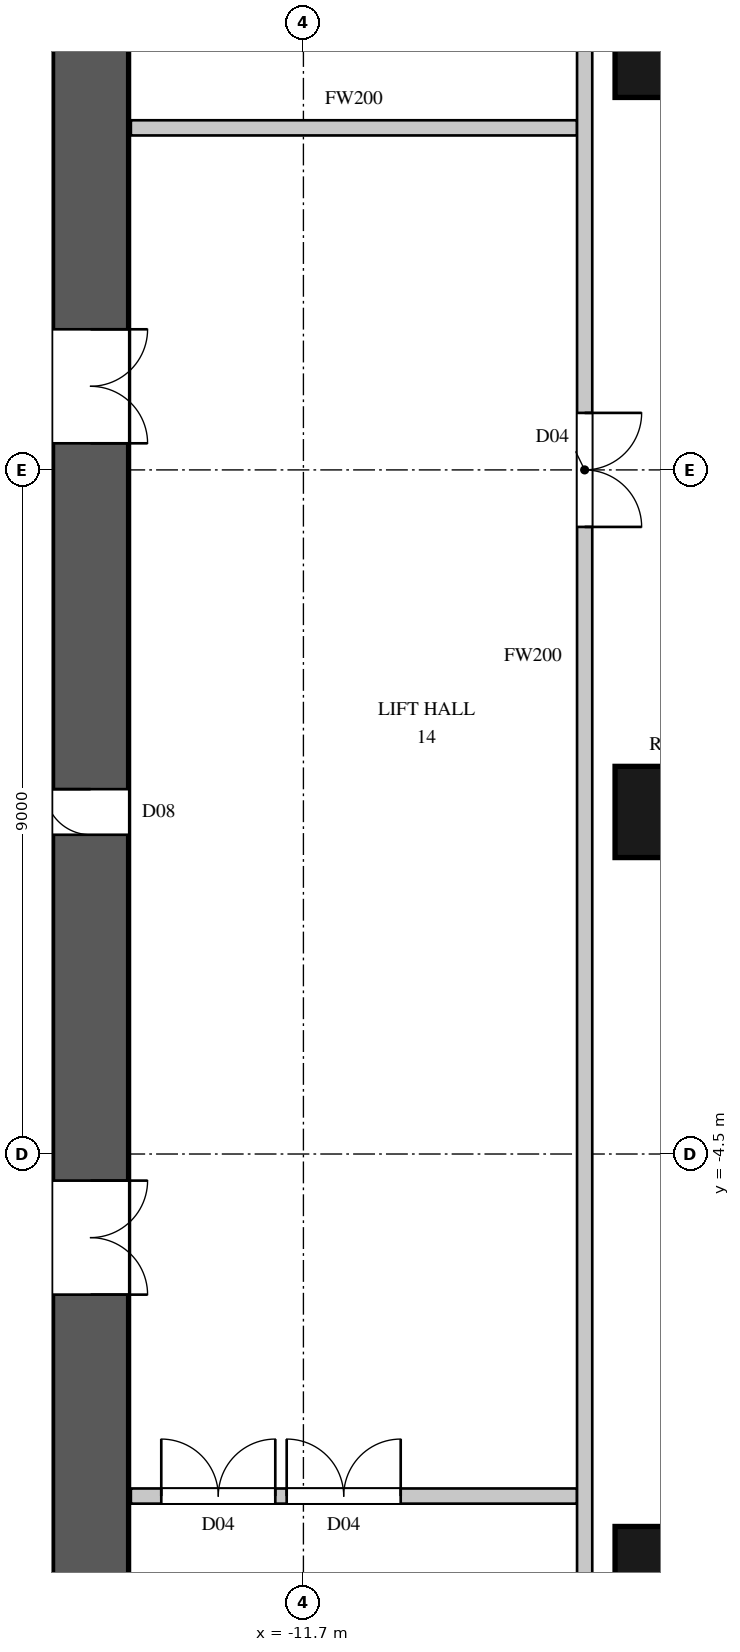
"""IFC4 building model, lengths in metres.
Left out: names, types, materials, properties, quantities, classifications, styles, units other than length and angle.
Written with IfcOpenShell. Run it as: python <this file> out.ifc"""

import sys

from ifc_helpers import new_model, si_unit, direction, frame, frame_2d, origin, origin_2d, place, context, subcontext, project, spatial, rectangle, circle, extrude, element, fill, save


model = new_model("IFC4")
c1 = context("Model", 3, precision=1e-05, world=origin(), true_north=direction((0.0, 1.0)))
c2 = subcontext(c1, "Body", "Model", "MODEL_VIEW")
j1 = project(units=[si_unit("LENGTHUNIT", "METRE"), si_unit("PLANEANGLEUNIT", "RADIAN")], contexts=[c1])
p1 = place(None, origin())
s1 = spatial("IfcSite", under=j1, at=p1, CompositionType="ELEMENT")
p2 = place(p1, origin())
s2 = spatial("IfcBuilding", under=s1, at=p2, CompositionType="ELEMENT")
p3 = place(p2, frame((0.0, 0.0, 80.7)))
s3 = spatial("IfcBuildingStorey", under=s2, at=p3, CompositionType="ELEMENT", Elevation=80.7)
for number, where, z_axis, x_axis in (
    (1, (-7.0, -10.0, 0.0), (0.0, 0.0, 1.0), (1.0, 0.0, 0.0)),
    (2, (-7.0, 0.0, 0.0), (0.0, 0.0, 1.0), (1.0, 0.0, 0.0)),
    (3, (-7.0, 10.0, 0.0), (0.0, 0.0, 1.0), (1.0, 0.0, 0.0)),
):
    element("IfcColumn", number, at=place(p3, frame(where, z_axis=z_axis, x_axis=x_axis)), inside=s3, PredefinedType="COLUMN", context=c2, shape_type="SweptSolid", body=[
        extrude(circle(Radius=0.6, at=origin_2d()), origin(), (0.0, 0.0, 1.0), 3.6),
    ])
p4 = place(p3, frame((-14.5, -14.8, 0.0), z_axis=(0.0, 0.0, 1.0), x_axis=(0.0, 1.0, 0.0)))
e4 = element("IfcWall", 4, at=p4, inside=s3, PredefinedType="SHEAR", context=c2, shape_type="SweptSolid", body=[
    extrude(rectangle(XDim=29.6, YDim=1.0, at=frame_2d((14.8, 0.0))), origin(), (0.0, 0.0, 1.0), 3.6),
])
p5 = place(p4, frame((8.45, 0.0, 0.0)))
e5 = element("IfcOpeningElement", 5, at=p5, cuts=e4, PredefinedType="OPENING", context=c2, shape_type="SweptSolid", body=[
    extrude(rectangle(XDim=1.5, YDim=2.4, at=frame_2d((0.75, 1.2))), frame((0.0, 0.51, 0.0), z_axis=(0.0, -1.0, 0.0), x_axis=(1.0, 0.0, 0.0)), (0.0, 0.0, 1.0), 1.02),
])
p6 = place(p4, frame((19.65, 0.0, 0.0)))
e6 = element("IfcOpeningElement", 6, at=p6, cuts=e4, PredefinedType="OPENING", context=c2, shape_type="SweptSolid", body=[
    extrude(rectangle(XDim=1.5, YDim=2.4, at=frame_2d((0.75, 1.2))), frame((0.0, 0.51, 0.0), z_axis=(0.0, -1.0, 0.0), x_axis=(1.0, 0.0, 0.0)), (0.0, 0.0, 1.0), 1.02),
])
p7 = place(p4, frame((14.5, 0.0, 0.0)))
e7 = element("IfcOpeningElement", 7, at=p7, cuts=e4, PredefinedType="OPENING", context=c2, shape_type="SweptSolid", body=[
    extrude(rectangle(XDim=0.6, YDim=2.0, at=frame_2d((0.3, 1.0))), frame((0.0, 0.51, 0.0), z_axis=(0.0, -1.0, 0.0), x_axis=(1.0, 0.0, 0.0)), (0.0, 0.0, 1.0), 1.02),
])
p8 = place(p3, frame((-13.97, -9.0, 0.0), z_axis=(0.0, 0.0, 1.0), x_axis=(1.0, 0.0, 0.0)))
e8 = element("IfcWall", 8, at=p8, inside=s3, PredefinedType="PARTITIONING", context=c2, shape_type="SweptSolid", body=[
    extrude(rectangle(XDim=5.87, YDim=0.2, at=frame_2d((2.935, 0.0))), origin(), (0.0, 0.0, 1.0), 3.3),
])
p9 = place(p8, frame((0.4, 0.0, 0.0)))
e9 = element("IfcOpeningElement", 9, at=p9, cuts=e8, PredefinedType="OPENING", context=c2, shape_type="SweptSolid", body=[
    extrude(rectangle(XDim=1.5, YDim=2.2, at=frame_2d((0.75, 1.1))), frame((0.0, 0.11, 0.0), z_axis=(0.0, -1.0, 0.0), x_axis=(1.0, 0.0, 0.0)), (0.0, 0.0, 1.0), 0.22),
])
p10 = place(p8, frame((2.05, 0.0, 0.0)))
e10 = element("IfcOpeningElement", 10, at=p10, cuts=e8, PredefinedType="OPENING", context=c2, shape_type="SweptSolid", body=[
    extrude(rectangle(XDim=1.5, YDim=2.2, at=frame_2d((0.75, 1.1))), frame((0.0, 0.11, 0.0), z_axis=(0.0, -1.0, 0.0), x_axis=(1.0, 0.0, 0.0)), (0.0, 0.0, 1.0), 0.22),
])
p11 = place(p3, frame((-13.97, 9.0, 0.0), z_axis=(0.0, 0.0, 1.0), x_axis=(1.0, 0.0, 0.0)))
e11 = element("IfcWall", 11, at=p11, inside=s3, PredefinedType="PARTITIONING", context=c2, shape_type="SweptSolid", body=[
    extrude(rectangle(XDim=5.87, YDim=0.2, at=frame_2d((2.935, 0.0))), origin(), (0.0, 0.0, 1.0), 3.3),
])
p12 = place(p3, frame((-8.0, -10.9, 0.0), z_axis=(0.0, 0.0, 1.0), x_axis=(0.0, 1.0, 0.0)))
e12 = element("IfcWall", 12, at=p12, inside=s3, PredefinedType="PARTITIONING", context=c2, shape_type="SweptSolid", body=[
    extrude(rectangle(XDim=25.9, YDim=0.2, at=frame_2d((12.95, 0.0))), origin(), (0.0, 0.0, 1.0), 3.3),
])
p13 = place(p12, frame((14.65, 0.0, 0.0)))
e13 = element("IfcOpeningElement", 13, at=p13, cuts=e12, PredefinedType="OPENING", context=c2, shape_type="SweptSolid", body=[
    extrude(rectangle(XDim=1.5, YDim=2.2, at=frame_2d((0.75, 1.1))), frame((0.0, 0.11, 0.0), z_axis=(0.0, -1.0, 0.0), x_axis=(1.0, 0.0, 0.0)), (0.0, 0.0, 1.0), 0.22),
])
p14 = place(p12, frame((24.15, 0.0, 0.0)))
e14 = element("IfcOpeningElement", 14, at=p14, cuts=e12, PredefinedType="OPENING", context=c2, shape_type="SweptSolid", body=[
    extrude(rectangle(XDim=1.6, YDim=2.4, at=frame_2d((0.8, 1.2))), frame((0.0, 0.11, 0.0), z_axis=(0.0, -1.0, 0.0), x_axis=(1.0, 0.0, 0.0)), (0.0, 0.0, 1.0), 0.22),
])
p15 = place(p13, origin())
e15 = element("IfcDoor", 15, at=p15, inside=s3, OperationType="DOUBLE_DOOR_SINGLE_SWING", PredefinedType="DOOR", context=c2, shape_type="SweptSolid", body=[
    extrude(rectangle(XDim=1.5, YDim=2.2, at=frame_2d((0.75, 1.1))), frame((0.0, 0.025, 0.0), z_axis=(0.0, -1.0, 0.0), x_axis=(1.0, 0.0, 0.0)), (0.0, 0.0, 1.0), 0.05),
])
fill(e13, e15)
p16 = place(p9, origin())
e16 = element("IfcDoor", 16, at=p16, inside=s3, OperationType="DOUBLE_DOOR_SINGLE_SWING", PredefinedType="DOOR", context=c2, shape_type="SweptSolid", body=[
    extrude(rectangle(XDim=1.5, YDim=2.2, at=frame_2d((0.75, 1.1))), frame((0.0, 0.025, 0.0), z_axis=(0.0, -1.0, 0.0), x_axis=(1.0, 0.0, 0.0)), (0.0, 0.0, 1.0), 0.05),
])
fill(e9, e16)
p17 = place(p10, origin())
e17 = element("IfcDoor", 17, at=p17, inside=s3, OperationType="DOUBLE_DOOR_SINGLE_SWING", PredefinedType="DOOR", context=c2, shape_type="SweptSolid", body=[
    extrude(rectangle(XDim=1.5, YDim=2.2, at=frame_2d((0.75, 1.1))), frame((0.0, 0.025, 0.0), z_axis=(0.0, -1.0, 0.0), x_axis=(1.0, 0.0, 0.0)), (0.0, 0.0, 1.0), 0.05),
])
fill(e10, e17)
p18 = place(p5, origin())
e18 = element("IfcDoor", 18, at=p18, inside=s3, OperationType="DOUBLE_DOOR_SINGLE_SWING", PredefinedType="DOOR", context=c2, shape_type="SweptSolid", body=[
    extrude(rectangle(XDim=1.5, YDim=2.4, at=frame_2d((0.75, 1.2))), frame((0.0, -0.445, 0.0), z_axis=(0.0, -1.0, 0.0), x_axis=(1.0, 0.0, 0.0)), (0.0, 0.0, 1.0), 0.05),
])
fill(e5, e18)
p19 = place(p6, origin())
e19 = element("IfcDoor", 19, at=p19, inside=s3, OperationType="DOUBLE_DOOR_SINGLE_SWING", PredefinedType="DOOR", context=c2, shape_type="SweptSolid", body=[
    extrude(rectangle(XDim=1.5, YDim=2.4, at=frame_2d((0.75, 1.2))), frame((0.0, -0.445, 0.0), z_axis=(0.0, -1.0, 0.0), x_axis=(1.0, 0.0, 0.0)), (0.0, 0.0, 1.0), 0.05),
])
fill(e6, e19)
p20 = place(p7, origin())
e20 = element("IfcDoor", 20, at=p20, inside=s3, OperationType="SINGLE_SWING_RIGHT", PredefinedType="DOOR", context=c2, shape_type="SweptSolid", body=[
    extrude(rectangle(XDim=0.6, YDim=2.0, at=frame_2d((0.3, 1.0))), frame((0.0, 0.495, 0.0), z_axis=(0.0, -1.0, 0.0), x_axis=(1.0, 0.0, 0.0)), (0.0, 0.0, 1.0), 0.05),
])
fill(e7, e20)
save(model, sys.argv[1])
